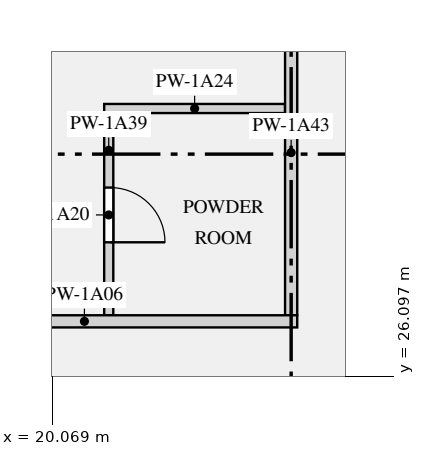
"""IFC4 building model, lengths in metres.
Left out: names, types, materials, properties, quantities, classifications, styles, units other than length and angle.
Written with IfcOpenShell. Run it as: python <this file> out.ifc"""

import sys

from ifc_helpers import new_model, si_unit, direction, frame, frame_2d, origin, place, context, subcontext, project, spatial, rectangle, extrude, element, fill, save


model = new_model("IFC4")
c1 = context("Model", 3, precision=1e-05, world=origin(), true_north=direction((0.0, 1.0)))
c2 = subcontext(c1, "Body", "Model", "MODEL_VIEW")
j1 = project(units=[si_unit("LENGTHUNIT", "METRE"), si_unit("PLANEANGLEUNIT", "RADIAN")], contexts=[c1])
p1 = place(None, origin())
s1 = spatial("IfcSite", under=j1, at=p1, CompositionType="ELEMENT")
p2 = place(p1, origin())
s2 = spatial("IfcBuilding", under=s1, at=p2, CompositionType="ELEMENT")
p3 = place(p2, frame((0.0, 0.0, 19.5)))
s3 = spatial("IfcBuildingStorey", under=s2, at=p3, CompositionType="ELEMENT", Elevation=19.5)
p4 = place(p3, frame((17.1, 27.0, 0.0), z_axis=(0.0, 0.0, 1.0), x_axis=(1.0, 0.0, 0.0)))
e1 = element("IfcWall", 1, at=p4, inside=s3, PredefinedType="PARTITIONING", context=c2, shape_type="SweptSolid", body=[
    extrude(rectangle(XDim=7.0, YDim=0.2, at=frame_2d((3.5, 0.0))), origin(), (0.0, 0.0, 1.0), 2.83),
])
p5 = place(p3, frame((20.925, 30.5, 0.0), z_axis=(0.0, 0.0, 1.0), x_axis=(1.0, 0.0, 0.0)))
e2 = element("IfcWall", 2, at=p5, inside=s3, PredefinedType="PARTITIONING", context=c2, shape_type="SweptSolid", body=[
    extrude(rectangle(XDim=2.975, YDim=0.15, at=frame_2d((1.487, 0.0))), origin(), (0.0, 0.0, 1.0), 2.83),
])
p6 = place(p3, frame((21.0, 27.1, 0.0), z_axis=(0.0, 0.0, 1.0), x_axis=(0.0, 1.0, 0.0)))
e3 = element("IfcWall", 3, at=p6, inside=s3, PredefinedType="PARTITIONING", context=c2, shape_type="SweptSolid", body=[
    extrude(rectangle(XDim=3.325, YDim=0.15, at=frame_2d((1.663, 0.0))), origin(), (0.0, 0.0, 1.0), 2.83),
])
p7 = place(p6, frame((1.2, 0.0, 0.0)))
e4 = element("IfcOpeningElement", 4, at=p7, cuts=e3, PredefinedType="OPENING", context=c2, shape_type="SweptSolid", body=[
    extrude(rectangle(XDim=0.9, YDim=2.1, at=frame_2d((0.45, 1.05))), frame((0.0, 0.085, 0.0), z_axis=(0.0, -1.0, 0.0), x_axis=(1.0, 0.0, 0.0)), (0.0, 0.0, 1.0), 0.17),
])
p8 = place(p3, frame((24.0, 27.1, 0.0), z_axis=(0.0, 0.0, 1.0), x_axis=(0.0, 1.0, 0.0)))
e5 = element("IfcWall", 5, at=p8, inside=s3, PredefinedType="PARTITIONING", context=c2, shape_type="SweptSolid", body=[
    extrude(rectangle(XDim=11.3, YDim=0.2, at=frame_2d((5.65, 0.0))), origin(), (0.0, 0.0, 1.0), 2.83),
])
p9 = place(p8, frame((5.35, 0.0, 0.0)))
e6 = element("IfcOpeningElement", 6, at=p9, cuts=e5, PredefinedType="OPENING", context=c2, shape_type="SweptSolid", body=[
    extrude(rectangle(XDim=1.1, YDim=2.1, at=frame_2d((0.55, 1.05))), frame((0.0, 0.11, 0.0), z_axis=(0.0, -1.0, 0.0), x_axis=(1.0, 0.0, 0.0)), (0.0, 0.0, 1.0), 0.22),
])
p10 = place(p7, frame((0.9, 0.0, 0.0), z_axis=(0.0, 0.0, 1.0), x_axis=(-1.0, 0.0, 0.0)))
e7 = element("IfcDoor", 7, at=p10, inside=s3, OperationType="SINGLE_SWING_RIGHT", PredefinedType="DOOR", context=c2, shape_type="SweptSolid", body=[
    extrude(rectangle(XDim=0.9, YDim=2.1, at=frame_2d((0.45, 1.05))), frame((0.0, 0.025, 0.0), z_axis=(0.0, -1.0, 0.0), x_axis=(1.0, 0.0, 0.0)), (0.0, 0.0, 1.0), 0.05),
])
fill(e4, e7)
save(model, sys.argv[1])
